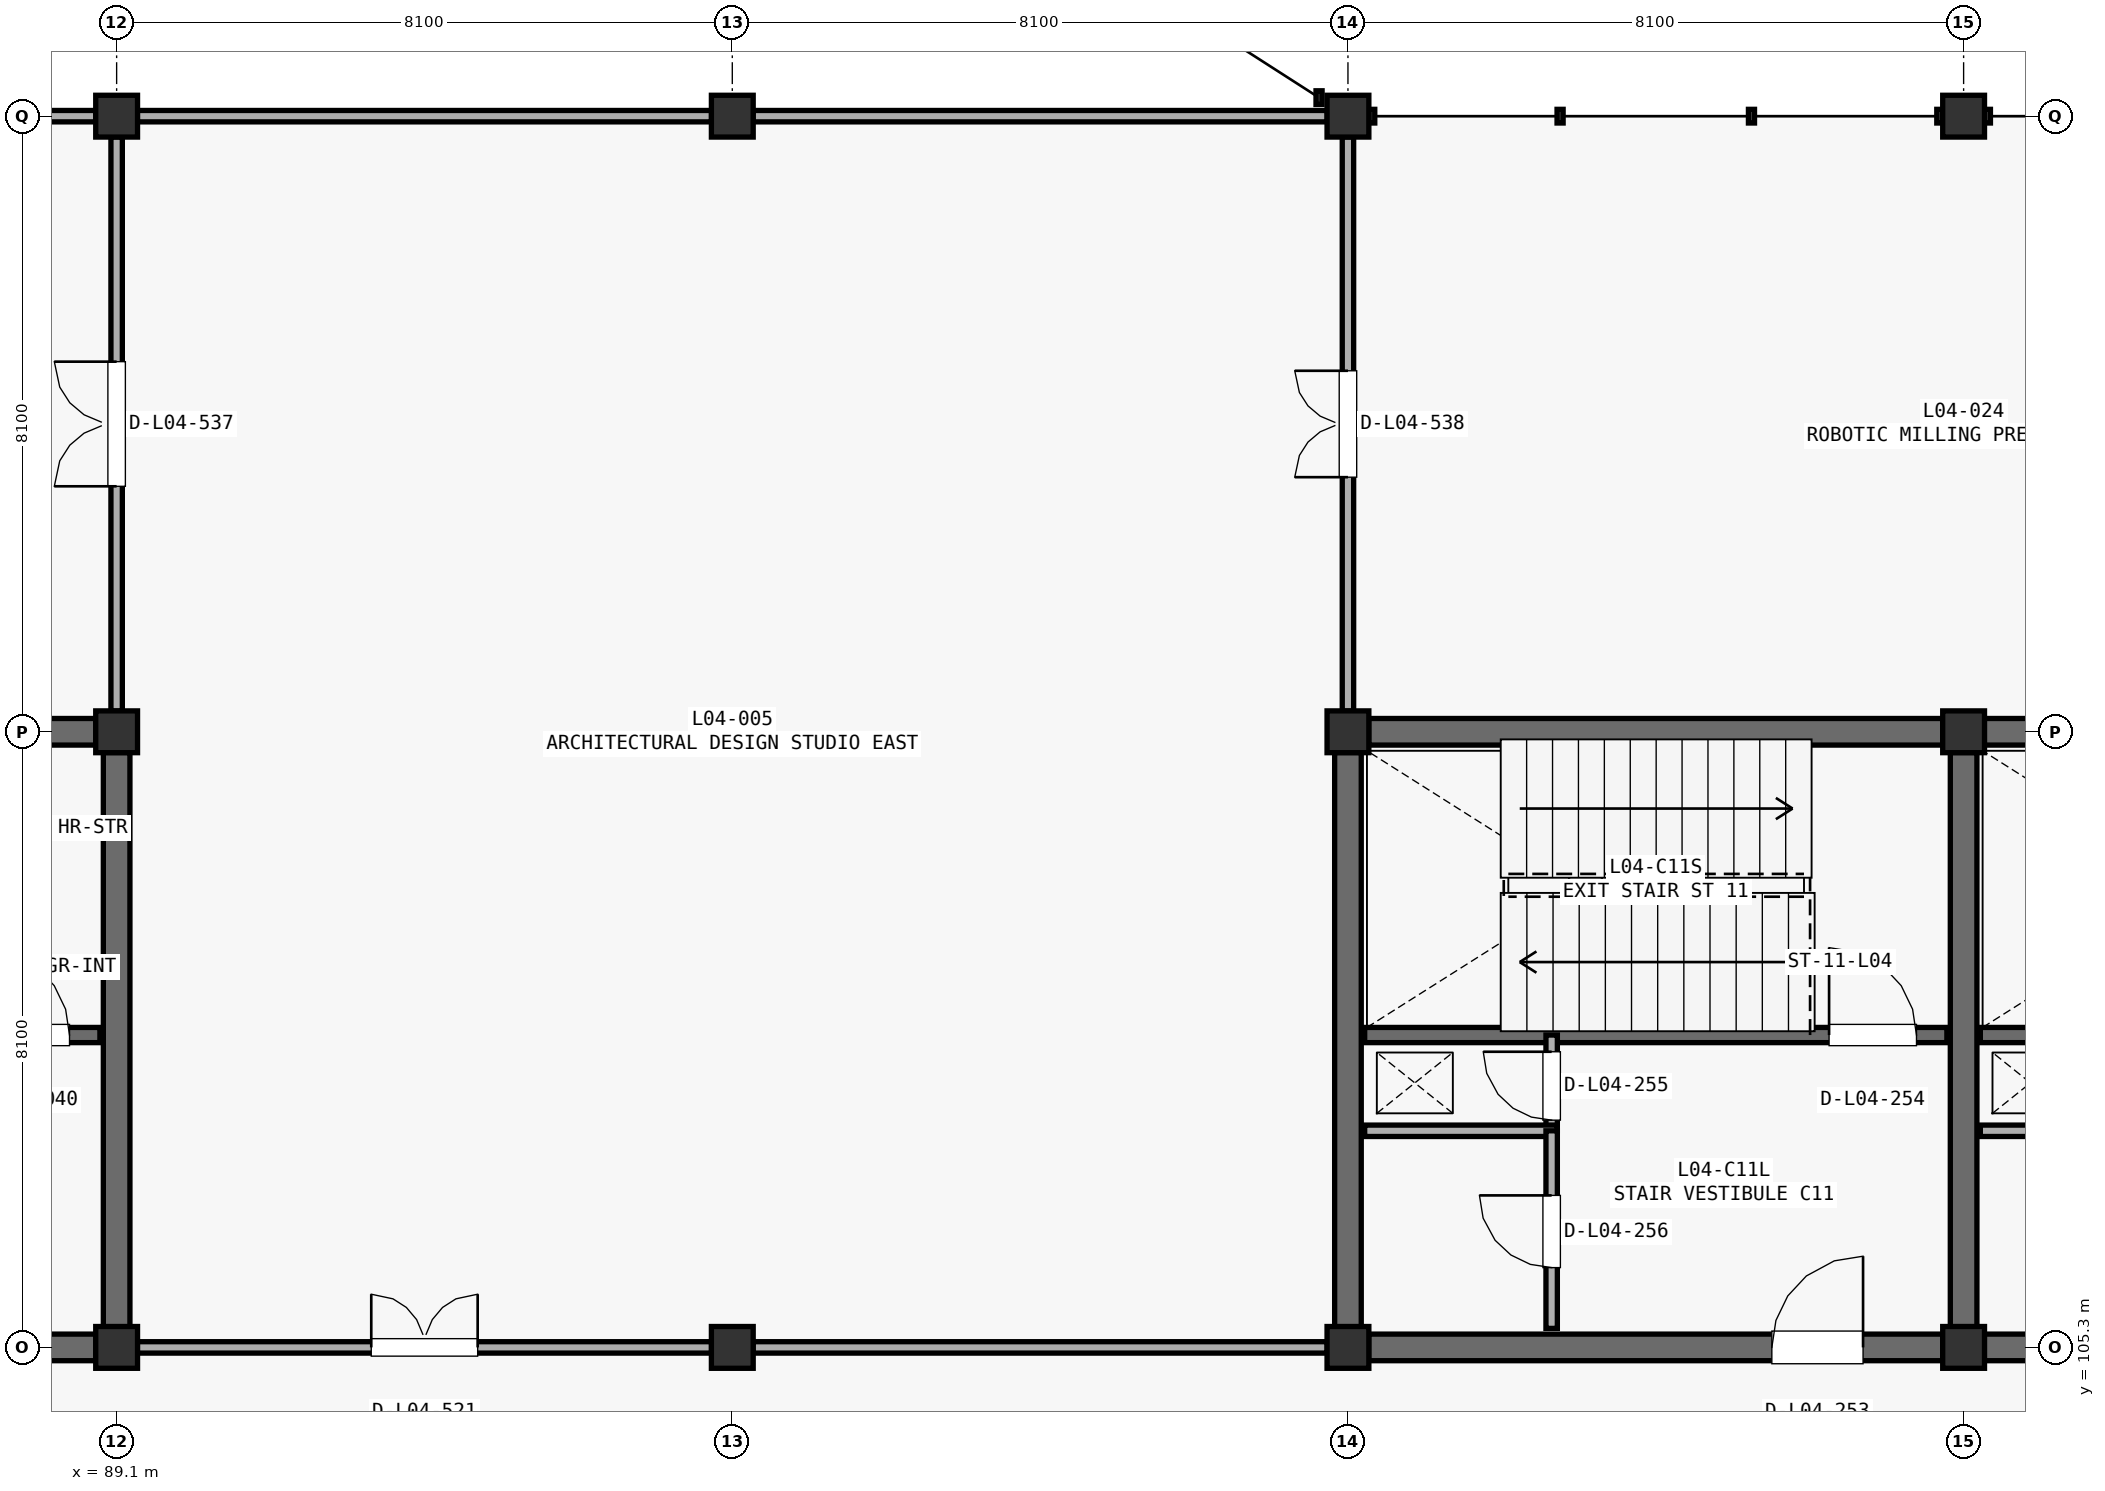
"""IFC4 building model, lengths in metres.
Left out: names, types, materials, properties, quantities, classifications, styles, units other than length and angle.
Written with IfcOpenShell. Run it as: python <this file> out.ifc"""

import sys

from ifc_helpers import new_model, si_unit, direction, frame, frame_2d, origin, origin_2d, place, context, subcontext, project, spatial, rectangle, extrude, element, fill, save


model = new_model("IFC4")
c1 = context("Model", 3, precision=1e-05, world=origin(), true_north=direction((0.0, 1.0)))
c2 = subcontext(c1, "Body", "Model", "MODEL_VIEW")
j1 = project(units=[si_unit("LENGTHUNIT", "METRE"), si_unit("PLANEANGLEUNIT", "RADIAN")], contexts=[c1])
p1 = place(None, origin())
s1 = spatial("IfcSite", under=j1, at=p1, CompositionType="ELEMENT")
p2 = place(p1, origin())
s2 = spatial("IfcBuilding", under=s1, at=p2, CompositionType="ELEMENT")
p3 = place(p2, frame((0.0, 0.0, 18.53)))
s3 = spatial("IfcBuildingStorey", under=s2, at=p3, CompositionType="ELEMENT", Elevation=18.53)
for number, where, z_axis, x_axis in (
    (1, (89.1, 105.3, 0.0), (0.0, 0.0, 1.0), (1.0, 0.0, 0.0)),
    (2, (89.1, 113.4, 0.0), (0.0, 0.0, 1.0), (1.0, 0.0, 0.0)),
    (3, (89.1, 121.5, 0.0), (0.0, 0.0, 1.0), (1.0, 0.0, 0.0)),
    (4, (97.2, 105.3, 0.0), (0.0, 0.0, 1.0), (1.0, 0.0, 0.0)),
    (5, (97.2, 113.4, 0.0), (0.0, 0.0, 1.0), (1.0, 0.0, 0.0)),
    (6, (97.2, 121.5, 0.0), (0.0, 0.0, 1.0), (1.0, 0.0, 0.0)),
    (7, (105.3, 105.3, 0.0), (0.0, 0.0, 1.0), (1.0, 0.0, 0.0)),
    (8, (105.3, 113.4, 0.0), (0.0, 0.0, 1.0), (1.0, 0.0, 0.0)),
    (9, (105.3, 121.5, 0.0), (0.0, 0.0, 1.0), (1.0, 0.0, 0.0)),
    (10, (113.4, 105.3, 0.0), (0.0, 0.0, 1.0), (1.0, 0.0, 0.0)),
    (11, (113.4, 113.4, 0.0), (0.0, 0.0, 1.0), (1.0, 0.0, 0.0)),
    (12, (113.4, 121.5, 0.0), (0.0, 0.0, 1.0), (1.0, 0.0, 0.0)),
):
    element("IfcColumn", number, at=place(p3, frame(where, z_axis=z_axis, x_axis=x_axis)), inside=s3, PredefinedType="COLUMN", context=c2, shape_type="SweptSolid", body=[
        extrude(rectangle(XDim=0.55, YDim=0.55, at=origin_2d()), origin(), (0.0, 0.0, 1.0), 4.42),
    ])
for number, where, z_axis, x_axis in (
    (13, (81.273, 113.4, 0.0), (0.0, 0.0, 1.0), (1.0, 0.0, 0.0)),
    (14, (89.1, 105.573, 0.0), (0.0, 0.0, 1.0), (0.0, 1.0, 0.0)),
):
    element("IfcWall", number, at=place(p3, frame(where, z_axis=z_axis, x_axis=x_axis)), inside=s3, PredefinedType="SHEAR", context=c2, shape_type="SweptSolid", body=[
        extrude(rectangle(XDim=7.554, YDim=0.35, at=frame_2d((3.777, 0.0))), origin(), (0.0, 0.0, 1.0), 4.162),
    ])
p4 = place(p3, frame((81.273, 105.3, 0.0), z_axis=(0.0, 0.0, 1.0), x_axis=(1.0, 0.0, 0.0)))
e15 = element("IfcWall", 15, at=p4, inside=s3, PredefinedType="SHEAR", context=c2, shape_type="SweptSolid", body=[
    extrude(rectangle(XDim=7.554, YDim=0.35, at=frame_2d((3.777, 0.0))), origin(), (0.0, 0.0, 1.0), 4.162),
])
p5 = place(p4, frame((5.304, 0.0, 0.0)))
e16 = element("IfcOpeningElement", 16, at=p5, cuts=e15, PredefinedType="OPENING", context=c2, shape_type="SweptSolid", body=[
    extrude(rectangle(XDim=1.2, YDim=2.2, at=frame_2d((0.6, 1.1))), frame((0.0, 0.185, 0.0), z_axis=(0.0, -1.0, 0.0), x_axis=(1.0, 0.0, 0.0)), (0.0, 0.0, 1.0), 0.37),
])
p6 = place(p3, frame((81.22, 109.41, 0.0), z_axis=(0.0, 0.0, 1.0), x_axis=(1.0, 0.0, 0.0)))
e17 = element("IfcWall", 17, at=p6, inside=s3, PredefinedType="SHEAR", context=c2, shape_type="SweptSolid", body=[
    extrude(rectangle(XDim=7.66, YDim=0.2, at=frame_2d((3.83, 0.0))), origin(), (0.0, 0.0, 1.0), 4.162),
])
p7 = place(p6, frame((6.11, 0.0, 0.0)))
e18 = element("IfcOpeningElement", 18, at=p7, cuts=e17, PredefinedType="OPENING", context=c2, shape_type="SweptSolid", body=[
    extrude(rectangle(XDim=1.15, YDim=2.2, at=frame_2d((0.575, 1.1))), frame((0.0, 0.11, 0.0), z_axis=(0.0, -1.0, 0.0), x_axis=(1.0, 0.0, 0.0)), (0.0, 0.0, 1.0), 0.22),
])
for number, where, z_axis, x_axis in (
    (19, (113.673, 113.4, 0.0), (0.0, 0.0, 1.0), (1.0, 0.0, 0.0)),
    (20, (113.4, 105.573, 0.0), (0.0, 0.0, 1.0), (0.0, 1.0, 0.0)),
):
    element("IfcWall", number, at=place(p3, frame(where, z_axis=z_axis, x_axis=x_axis)), inside=s3, PredefinedType="SHEAR", context=c2, shape_type="SweptSolid", body=[
        extrude(rectangle(XDim=7.554, YDim=0.35, at=frame_2d((3.777, 0.0))), origin(), (0.0, 0.0, 1.0), 4.162),
    ])
p8 = place(p3, frame((113.673, 105.3, 0.0), z_axis=(0.0, 0.0, 1.0), x_axis=(1.0, 0.0, 0.0)))
e21 = element("IfcWall", 21, at=p8, inside=s3, PredefinedType="SHEAR", context=c2, shape_type="SweptSolid", body=[
    extrude(rectangle(XDim=7.554, YDim=0.35, at=frame_2d((3.777, 0.0))), origin(), (0.0, 0.0, 1.0), 4.162),
])
p9 = place(p8, frame((5.304, 0.0, 0.0)))
e22 = element("IfcOpeningElement", 22, at=p9, cuts=e21, PredefinedType="OPENING", context=c2, shape_type="SweptSolid", body=[
    extrude(rectangle(XDim=1.2, YDim=2.2, at=frame_2d((0.6, 1.1))), frame((0.0, 0.185, 0.0), z_axis=(0.0, -1.0, 0.0), x_axis=(1.0, 0.0, 0.0)), (0.0, 0.0, 1.0), 0.37),
])
p10 = place(p3, frame((113.62, 109.41, 0.0), z_axis=(0.0, 0.0, 1.0), x_axis=(1.0, 0.0, 0.0)))
e23 = element("IfcWall", 23, at=p10, inside=s3, PredefinedType="SHEAR", context=c2, shape_type="SweptSolid", body=[
    extrude(rectangle(XDim=7.66, YDim=0.2, at=frame_2d((3.83, 0.0))), origin(), (0.0, 0.0, 1.0), 4.162),
])
p11 = place(p10, frame((6.11, 0.0, 0.0)))
e24 = element("IfcOpeningElement", 24, at=p11, cuts=e23, PredefinedType="OPENING", context=c2, shape_type="SweptSolid", body=[
    extrude(rectangle(XDim=1.15, YDim=2.2, at=frame_2d((0.575, 1.1))), frame((0.0, 0.11, 0.0), z_axis=(0.0, -1.0, 0.0), x_axis=(1.0, 0.0, 0.0)), (0.0, 0.0, 1.0), 0.22),
])
p12 = place(p3, frame((113.62, 108.15, 0.0), z_axis=(0.0, 0.0, 1.0), x_axis=(1.0, 0.0, 0.0)))
e25 = element("IfcWall", 25, at=p12, inside=s3, PredefinedType="PARTITIONING", context=c2, shape_type="SweptSolid", body=[
    extrude(rectangle(XDim=2.53, YDim=0.15, at=frame_2d((1.265, 0.0))), origin(), (0.0, 0.0, 1.0), 4.162),
])
for number, where, z_axis, x_axis in (
    (26, (105.573, 113.4, 0.0), (0.0, 0.0, 1.0), (1.0, 0.0, 0.0)),
    (27, (105.3, 105.573, 0.0), (0.0, 0.0, 1.0), (0.0, 1.0, 0.0)),
):
    element("IfcWall", number, at=place(p3, frame(where, z_axis=z_axis, x_axis=x_axis)), inside=s3, PredefinedType="SHEAR", context=c2, shape_type="SweptSolid", body=[
        extrude(rectangle(XDim=7.554, YDim=0.35, at=frame_2d((3.777, 0.0))), origin(), (0.0, 0.0, 1.0), 4.162),
    ])
p13 = place(p3, frame((105.573, 105.3, 0.0), z_axis=(0.0, 0.0, 1.0), x_axis=(1.0, 0.0, 0.0)))
e28 = element("IfcWall", 28, at=p13, inside=s3, PredefinedType="SHEAR", context=c2, shape_type="SweptSolid", body=[
    extrude(rectangle(XDim=7.554, YDim=0.35, at=frame_2d((3.777, 0.0))), origin(), (0.0, 0.0, 1.0), 4.162),
])
p14 = place(p13, frame((5.304, 0.0, 0.0)))
e29 = element("IfcOpeningElement", 29, at=p14, cuts=e28, PredefinedType="OPENING", context=c2, shape_type="SweptSolid", body=[
    extrude(rectangle(XDim=1.2, YDim=2.2, at=frame_2d((0.6, 1.1))), frame((0.0, 0.185, 0.0), z_axis=(0.0, -1.0, 0.0), x_axis=(1.0, 0.0, 0.0)), (0.0, 0.0, 1.0), 0.37),
])
p15 = place(p3, frame((105.52, 109.41, 0.0), z_axis=(0.0, 0.0, 1.0), x_axis=(1.0, 0.0, 0.0)))
e30 = element("IfcWall", 30, at=p15, inside=s3, PredefinedType="SHEAR", context=c2, shape_type="SweptSolid", body=[
    extrude(rectangle(XDim=7.66, YDim=0.2, at=frame_2d((3.83, 0.0))), origin(), (0.0, 0.0, 1.0), 4.162),
])
p16 = place(p15, frame((6.11, 0.0, 0.0)))
e31 = element("IfcOpeningElement", 31, at=p16, cuts=e30, PredefinedType="OPENING", context=c2, shape_type="SweptSolid", body=[
    extrude(rectangle(XDim=1.15, YDim=2.2, at=frame_2d((0.575, 1.1))), frame((0.0, 0.11, 0.0), z_axis=(0.0, -1.0, 0.0), x_axis=(1.0, 0.0, 0.0)), (0.0, 0.0, 1.0), 0.22),
])
p17 = place(p3, frame((107.98, 108.15, 0.0), z_axis=(0.0, 0.0, 1.0), x_axis=(0.0, 1.0, 0.0)))
e32 = element("IfcWall", 32, at=p17, inside=s3, PredefinedType="PARTITIONING", context=c2, shape_type="SweptSolid", body=[
    extrude(rectangle(XDim=1.26, YDim=0.15, at=frame_2d((0.63, 0.0))), origin(), (0.0, 0.0, 1.0), 4.162),
])
p18 = place(p17, frame((0.14, 0.0, 0.0)))
e33 = element("IfcOpeningElement", 33, at=p18, cuts=e32, PredefinedType="OPENING", context=c2, shape_type="SweptSolid", body=[
    extrude(rectangle(XDim=0.9, YDim=2.15, at=frame_2d((0.45, 1.075))), frame((0.0, 0.085, 0.0), z_axis=(0.0, -1.0, 0.0), x_axis=(1.0, 0.0, 0.0)), (0.0, 0.0, 1.0), 0.17),
])
p19 = place(p3, frame((105.52, 108.15, 0.0), z_axis=(0.0, 0.0, 1.0), x_axis=(1.0, 0.0, 0.0)))
e34 = element("IfcWall", 34, at=p19, inside=s3, PredefinedType="PARTITIONING", context=c2, shape_type="SweptSolid", body=[
    extrude(rectangle(XDim=2.53, YDim=0.15, at=frame_2d((1.265, 0.0))), origin(), (0.0, 0.0, 1.0), 4.162),
])
p20 = place(p3, frame((107.98, 105.55, 0.0), z_axis=(0.0, 0.0, 1.0), x_axis=(0.0, 1.0, 0.0)))
e35 = element("IfcWall", 35, at=p20, inside=s3, PredefinedType="PARTITIONING", context=c2, shape_type="SweptSolid", body=[
    extrude(rectangle(XDim=2.6, YDim=0.15, at=frame_2d((1.3, 0.0))), origin(), (0.0, 0.0, 1.0), 4.162),
])
p21 = place(p20, frame((0.8, 0.0, 0.0)))
e36 = element("IfcOpeningElement", 36, at=p21, cuts=e35, PredefinedType="OPENING", context=c2, shape_type="SweptSolid", body=[
    extrude(rectangle(XDim=0.95, YDim=2.15, at=frame_2d((0.475, 1.075))), frame((0.0, 0.085, 0.0), z_axis=(0.0, -1.0, 0.0), x_axis=(1.0, 0.0, 0.0)), (0.0, 0.0, 1.0), 0.17),
])
p22 = place(p3, frame((89.373, 105.3, 0.0), z_axis=(0.0, 0.0, 1.0), x_axis=(1.0, 0.0, 0.0)))
e37 = element("IfcWall", 37, at=p22, inside=s3, PredefinedType="PARTITIONING", context=c2, shape_type="SweptSolid", body=[
    extrude(rectangle(XDim=7.554, YDim=0.15, at=frame_2d((3.777, 0.0))), origin(), (0.0, 0.0, 1.0), 3.212),
])
p23 = place(p22, frame((3.077, 0.0, 0.0)))
e38 = element("IfcOpeningElement", 38, at=p23, cuts=e37, PredefinedType="OPENING", context=c2, shape_type="SweptSolid", body=[
    extrude(rectangle(XDim=1.4, YDim=2.2, at=frame_2d((0.7, 1.1))), frame((0.0, 0.085, 0.0), z_axis=(0.0, -1.0, 0.0), x_axis=(1.0, 0.0, 0.0)), (0.0, 0.0, 1.0), 0.17),
])
p24 = place(p3, frame((97.473, 105.3, 0.0), z_axis=(0.0, 0.0, 1.0), x_axis=(1.0, 0.0, 0.0)))
e39 = element("IfcWall", 39, at=p24, inside=s3, PredefinedType="PARTITIONING", context=c2, shape_type="SweptSolid", body=[
    extrude(rectangle(XDim=7.554, YDim=0.15, at=frame_2d((3.777, 0.0))), origin(), (0.0, 0.0, 1.0), 3.412),
])
p25 = place(p3, frame((105.3, 113.673, 0.0), z_axis=(0.0, 0.0, 1.0), x_axis=(0.0, 1.0, 0.0)))
e40 = element("IfcWall", 40, at=p25, inside=s3, PredefinedType="PARTITIONING", context=c2, shape_type="SweptSolid", body=[
    extrude(rectangle(XDim=7.554, YDim=0.15, at=frame_2d((3.777, 0.0))), origin(), (0.0, 0.0, 1.0), 3.412),
])
p26 = place(p25, frame((3.077, 0.0, 0.0)))
e41 = element("IfcOpeningElement", 41, at=p26, cuts=e40, PredefinedType="OPENING", context=c2, shape_type="SweptSolid", body=[
    extrude(rectangle(XDim=1.4, YDim=2.2, at=frame_2d((0.7, 1.1))), frame((0.0, 0.085, 0.0), z_axis=(0.0, -1.0, 0.0), x_axis=(1.0, 0.0, 0.0)), (0.0, 0.0, 1.0), 0.17),
])
p27 = place(p3, frame((89.1, 113.673, 0.0), z_axis=(0.0, 0.0, 1.0), x_axis=(0.0, 1.0, 0.0)))
e42 = element("IfcWall", 42, at=p27, inside=s3, PredefinedType="PARTITIONING", context=c2, shape_type="SweptSolid", body=[
    extrude(rectangle(XDim=7.554, YDim=0.15, at=frame_2d((3.777, 0.0))), origin(), (0.0, 0.0, 1.0), 3.512),
])
p28 = place(p27, frame((2.957, 0.0, 0.0)))
e43 = element("IfcOpeningElement", 43, at=p28, cuts=e42, PredefinedType="OPENING", context=c2, shape_type="SweptSolid", body=[
    extrude(rectangle(XDim=1.64, YDim=2.25, at=frame_2d((0.82, 1.125))), frame((0.0, 0.085, 0.0), z_axis=(0.0, -1.0, 0.0), x_axis=(1.0, 0.0, 0.0)), (0.0, 0.0, 1.0), 0.17),
])
p29 = place(p3, frame((89.373, 121.5, 0.0), z_axis=(0.0, 0.0, 1.0), x_axis=(1.0, 0.0, 0.0)))
e44 = element("IfcWall", 44, at=p29, inside=s3, PredefinedType="PARTITIONING", context=c2, shape_type="SweptSolid", body=[
    extrude(rectangle(XDim=7.554, YDim=0.15, at=frame_2d((3.777, 0.0))), origin(), (0.0, 0.0, 1.0), 3.512),
])
p30 = place(p3, frame((97.473, 121.5, 0.0), z_axis=(0.0, 0.0, 1.0), x_axis=(1.0, 0.0, 0.0)))
e45 = element("IfcWall", 45, at=p30, inside=s3, PredefinedType="PARTITIONING", context=c2, shape_type="SweptSolid", body=[
    extrude(rectangle(XDim=7.554, YDim=0.15, at=frame_2d((3.777, 0.0))), origin(), (0.0, 0.0, 1.0), 3.512),
])
p31 = place(p3, frame((81.273, 121.5, 0.0), z_axis=(0.0, 0.0, 1.0), x_axis=(1.0, 0.0, 0.0)))
e46 = element("IfcWall", 46, at=p31, inside=s3, PredefinedType="PARTITIONING", context=c2, shape_type="SweptSolid", body=[
    extrude(rectangle(XDim=7.554, YDim=0.15, at=frame_2d((3.777, 0.0))), origin(), (0.0, 0.0, 1.0), 3.412),
])
p32 = place(p7, origin())
e47 = element("IfcDoor", 47, at=p32, inside=s3, OperationType="SINGLE_SWING_LEFT", PredefinedType="DOOR", context=c2, shape_type="SweptSolid", body=[
    extrude(rectangle(XDim=1.15, YDim=2.2, at=frame_2d((0.575, 1.1))), frame((0.0, 0.025, 0.0), z_axis=(0.0, -1.0, 0.0), x_axis=(1.0, 0.0, 0.0)), (0.0, 0.0, 1.0), 0.05),
])
fill(e18, e47)
p33 = place(p14, origin())
e48 = element("IfcDoor", 48, at=p33, inside=s3, OperationType="SINGLE_SWING_RIGHT", PredefinedType="DOOR", context=c2, shape_type="SweptSolid", body=[
    extrude(rectangle(XDim=1.2, YDim=2.2, at=frame_2d((0.6, 1.1))), frame((0.0, 0.025, 0.0), z_axis=(0.0, -1.0, 0.0), x_axis=(1.0, 0.0, 0.0)), (0.0, 0.0, 1.0), 0.05),
])
fill(e29, e48)
p34 = place(p16, origin())
e49 = element("IfcDoor", 49, at=p34, inside=s3, OperationType="SINGLE_SWING_LEFT", PredefinedType="DOOR", context=c2, shape_type="SweptSolid", body=[
    extrude(rectangle(XDim=1.15, YDim=2.2, at=frame_2d((0.575, 1.1))), frame((0.0, 0.025, 0.0), z_axis=(0.0, -1.0, 0.0), x_axis=(1.0, 0.0, 0.0)), (0.0, 0.0, 1.0), 0.05),
])
fill(e31, e49)
p35 = place(p18, origin())
e50 = element("IfcDoor", 50, at=p35, inside=s3, OperationType="SINGLE_SWING_RIGHT", PredefinedType="DOOR", context=c2, shape_type="SweptSolid", body=[
    extrude(rectangle(XDim=0.9, YDim=2.15, at=frame_2d((0.45, 1.075))), frame((0.0, 0.025, 0.0), z_axis=(0.0, -1.0, 0.0), x_axis=(1.0, 0.0, 0.0)), (0.0, 0.0, 1.0), 0.05),
])
fill(e33, e50)
p36 = place(p21, origin())
e51 = element("IfcDoor", 51, at=p36, inside=s3, OperationType="SINGLE_SWING_RIGHT", PredefinedType="DOOR", context=c2, shape_type="SweptSolid", body=[
    extrude(rectangle(XDim=0.95, YDim=2.15, at=frame_2d((0.475, 1.075))), frame((0.0, 0.025, 0.0), z_axis=(0.0, -1.0, 0.0), x_axis=(1.0, 0.0, 0.0)), (0.0, 0.0, 1.0), 0.05),
])
fill(e36, e51)
p37 = place(p23, origin())
e52 = element("IfcDoor", 52, at=p37, inside=s3, OperationType="DOUBLE_SWING_LEFT", PredefinedType="DOOR", context=c2, shape_type="SweptSolid", body=[
    extrude(rectangle(XDim=1.4, YDim=2.2, at=frame_2d((0.7, 1.1))), frame((0.0, 0.025, 0.0), z_axis=(0.0, -1.0, 0.0), x_axis=(1.0, 0.0, 0.0)), (0.0, 0.0, 1.0), 0.05),
])
fill(e38, e52)
p38 = place(p28, origin())
e53 = element("IfcDoor", 53, at=p38, inside=s3, OperationType="DOUBLE_SWING_LEFT", PredefinedType="DOOR", context=c2, shape_type="SweptSolid", body=[
    extrude(rectangle(XDim=1.64, YDim=2.25, at=frame_2d((0.82, 1.125))), frame((0.0, 0.025, 0.0), z_axis=(0.0, -1.0, 0.0), x_axis=(1.0, 0.0, 0.0)), (0.0, 0.0, 1.0), 0.05),
])
fill(e43, e53)
p39 = place(p26, origin())
e54 = element("IfcDoor", 54, at=p39, inside=s3, OperationType="DOUBLE_SWING_LEFT", PredefinedType="DOOR", context=c2, shape_type="SweptSolid", body=[
    extrude(rectangle(XDim=1.4, YDim=2.2, at=frame_2d((0.7, 1.1))), frame((0.0, 0.025, 0.0), z_axis=(0.0, -1.0, 0.0), x_axis=(1.0, 0.0, 0.0)), (0.0, 0.0, 1.0), 0.05),
])
fill(e41, e54)
save(model, sys.argv[1])
